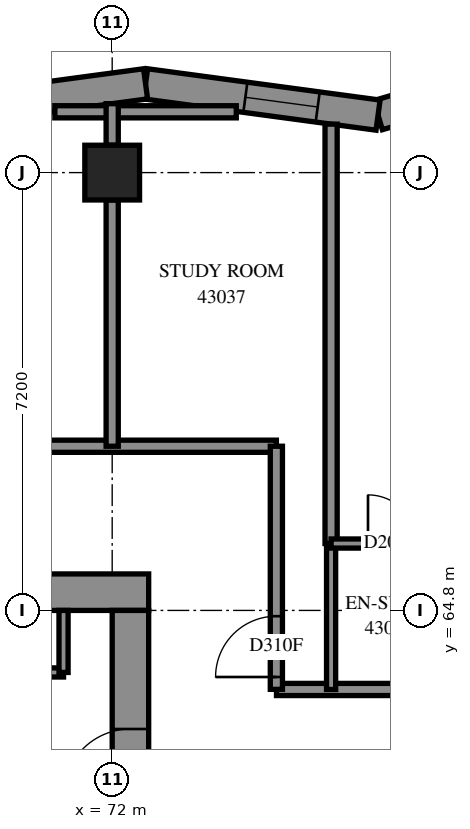
"""IFC4 building model, lengths in metres.
Left out: names, types, materials, properties, quantities, classifications, styles, units other than length and angle.
Written with IfcOpenShell. Run it as: python <this file> out.ifc"""

import sys

from ifc_helpers import new_model, si_unit, direction, frame, frame_2d, origin, origin_2d, place, context, subcontext, project, spatial, polyline, rectangle, outline, extrude, element, fill, save


model = new_model("IFC4")
c1 = context("Model", 3, precision=1e-05, world=origin(), true_north=direction((0.0, 1.0)))
c2 = subcontext(c1, "Body", "Model", "MODEL_VIEW")
j1 = project(units=[si_unit("LENGTHUNIT", "METRE"), si_unit("PLANEANGLEUNIT", "RADIAN")], contexts=[c1])
p1 = place(None, origin())
s1 = spatial("IfcSite", under=j1, at=p1, CompositionType="ELEMENT")
p2 = place(p1, origin())
s2 = spatial("IfcBuilding", under=s1, at=p2, CompositionType="ELEMENT")
p3 = place(p2, frame((0.0, 0.0, 159.2)))
s3 = spatial("IfcBuildingStorey", under=s2, at=p3, CompositionType="ELEMENT", Elevation=159.2)
p4 = place(p3, frame((72.0, 72.0, 0.0), z_axis=(0.0, 0.0, 1.0), x_axis=(1.0, 0.0, 0.0)))
e1 = element("IfcColumn", 1, at=p4, inside=s3, PredefinedType="COLUMN", context=c2, shape_type="SweptSolid", body=[
    extrude(rectangle(XDim=0.9, YDim=0.9, at=origin_2d()), origin(), (0.0, 0.0, 1.0), 3.1),
])
p5 = place(p3, frame((57.0, 65.1, -0.3), z_axis=(0.0, 0.0, 1.0), x_axis=(1.0, 0.0, 0.0)))
e2 = element("IfcWall", 2, at=p5, inside=s3, PredefinedType="SHEAR", context=c2, shape_type="SweptSolid", body=[
    extrude(rectangle(XDim=15.6, YDim=0.6, at=frame_2d((7.8, 0.0))), origin(), (0.0, 0.0, 1.0), 2.7),
])
p6 = place(p5, frame((10.6, 0.0, 0.3)))
e3 = element("IfcOpeningElement", 3, at=p6, cuts=e2, PredefinedType="OPENING", context=c2, shape_type="SweptSolid", body=[
    extrude(rectangle(XDim=0.8, YDim=2.1, at=frame_2d((0.4, 1.05))), frame((0.0, 0.31, 0.0), z_axis=(0.0, -1.0, 0.0), x_axis=(1.0, 0.0, 0.0)), (0.0, 0.0, 1.0), 0.62),
])
p7 = place(p3, frame((72.3, 50.4, -0.3), z_axis=(0.0, 0.0, 1.0), x_axis=(0.0, 1.0, 0.0)))
e4 = element("IfcWall", 4, at=p7, inside=s3, PredefinedType="SHEAR", context=c2, shape_type="SweptSolid", body=[
    extrude(rectangle(XDim=14.4, YDim=0.6, at=frame_2d((7.2, 0.0))), origin(), (0.0, 0.0, 1.0), 2.7),
])
p8 = place(p7, frame((4.55, 0.0, 0.3)))
e5 = element("IfcOpeningElement", 5, at=p8, cuts=e4, PredefinedType="OPENING", context=c2, shape_type="SweptSolid", body=[
    extrude(rectangle(XDim=1.1, YDim=2.1, at=frame_2d((0.55, 1.05))), frame((0.0, 0.31, 0.0), z_axis=(0.0, -1.0, 0.0), x_axis=(1.0, 0.0, 0.0)), (0.0, 0.0, 1.0), 0.62),
])
p9 = place(p7, frame((11.35, 0.0, 0.3)))
e6 = element("IfcOpeningElement", 6, at=p9, cuts=e4, PredefinedType="OPENING", context=c2, shape_type="SweptSolid", body=[
    extrude(rectangle(XDim=1.1, YDim=2.1, at=frame_2d((0.55, 1.05))), frame((0.0, 0.31, 0.0), z_axis=(0.0, -1.0, 0.0), x_axis=(1.0, 0.0, 0.0)), (0.0, 0.0, 1.0), 0.62),
])
p10 = place(p3, frame((80.028, 74.014, 0.0), z_axis=(0.0, 0.0, 1.0), x_axis=(-0.9598407547, -0.2805454075, 0.0)))
e7 = element("IfcWall", 7, at=p10, inside=s3, PredefinedType="SOLIDWALL", context=c2, shape_type="SweptSolid", body=[
    extrude(outline(polyline([(-0.208, -0.25), (3.756, -0.25), (3.862, 0.25), (0.208, 0.25), (-0.208, -0.25)])), origin(), (0.0, 0.0, 1.0), 3.1),
])
p11 = place(p10, frame((1.286, 0.0, 0.45)))
e8 = element("IfcOpeningElement", 8, at=p11, cuts=e7, PredefinedType="OPENING", context=c2, shape_type="SweptSolid", body=[
    extrude(rectangle(XDim=1.2, YDim=2.5, at=frame_2d((0.6, 1.25))), frame((0.0, 0.26, 0.0), z_axis=(0.0, -1.0, 0.0), x_axis=(1.0, 0.0, 0.0)), (0.0, 0.0, 1.0), 0.52),
])
p12 = place(p3, frame((76.373, 72.945, 0.0), z_axis=(0.0, 0.0, 1.0), x_axis=(-0.9910680415, 0.1333571784, 0.0)))
e9 = element("IfcWall", 9, at=p12, inside=s3, PredefinedType="SOLIDWALL", context=c2, shape_type="SweptSolid", body=[
    extrude(outline(polyline([(0.053, -0.25), (3.892, -0.25), (3.824, 0.25), (-0.053, 0.25), (0.053, -0.25)])), origin(), (0.0, 0.0, 1.0), 3.1),
])
p13 = place(p12, frame((1.002, 0.0, 0.45)))
e10 = element("IfcOpeningElement", 10, at=p13, cuts=e9, PredefinedType="OPENING", context=c2, shape_type="SweptSolid", body=[
    extrude(rectangle(XDim=1.2, YDim=2.5, at=frame_2d((0.6, 1.25))), frame((0.0, 0.26, 0.0), z_axis=(0.0, -1.0, 0.0), x_axis=(1.0, 0.0, 0.0)), (0.0, 0.0, 1.0), 0.52),
])
p14 = place(p3, frame((72.549, 73.46, 0.0), z_axis=(0.0, 0.0, 1.0), x_axis=(-0.9910651652, -0.1333785524, 0.0)))
e11 = element("IfcWall", 11, at=p14, inside=s3, PredefinedType="SOLIDWALL", context=c2, shape_type="SweptSolid", body=[
    extrude(outline(polyline([(-0.034, -0.25), (3.805, -0.25), (3.872, 0.25), (0.034, 0.25), (-0.034, -0.25)])), origin(), (0.0, 0.0, 1.0), 3.1),
])
p15 = place(p14, frame((1.668, 0.0, 0.7)))
e12 = element("IfcOpeningElement", 12, at=p15, cuts=e11, PredefinedType="OPENING", context=c2, shape_type="SweptSolid", body=[
    extrude(rectangle(XDim=1.8, YDim=2.2, at=frame_2d((0.9, 1.1))), frame((0.0, 0.26, 0.0), z_axis=(0.0, -1.0, 0.0), x_axis=(1.0, 0.0, 0.0)), (0.0, 0.0, 1.0), 0.52),
])
p16 = place(p3, frame((64.95, 63.78, 0.0), z_axis=(0.0, 0.0, 1.0), x_axis=(1.0, 0.0, 0.0)))
e13 = element("IfcWall", 13, at=p16, inside=s3, PredefinedType="PARTITIONING", context=c2, shape_type="SweptSolid", body=[
    extrude(rectangle(XDim=6.25, YDim=0.15, at=frame_2d((3.125, 0.0))), origin(), (0.0, 0.0, 1.0), 3.1),
])
p17 = place(p3, frame((71.2, 63.78, 0.0), z_axis=(0.0, 0.0, 1.0), x_axis=(0.0, 1.0, 0.0)))
e14 = element("IfcWall", 14, at=p17, inside=s3, PredefinedType="PARTITIONING", context=c2, shape_type="SweptSolid", body=[
    extrude(rectangle(XDim=1.02, YDim=0.15, at=frame_2d((0.51, 0.0))), origin(), (0.0, 0.0, 1.0), 3.1),
])
p18 = place(p3, frame((54.9, 67.5, 0.0), z_axis=(0.0, 0.0, 1.0), x_axis=(1.0, 0.0, 0.0)))
e15 = element("IfcWall", 15, at=p18, inside=s3, PredefinedType="PARTITIONING", context=c2, shape_type="SweptSolid", body=[
    extrude(rectangle(XDim=19.8, YDim=0.2, at=frame_2d((9.9, 0.0))), origin(), (0.0, 0.0, 1.0), 3.1),
])
p19 = place(p18, frame((6.599, 0.0, 0.0)))
e16 = element("IfcOpeningElement", 16, at=p19, cuts=e15, PredefinedType="OPENING", context=c2, shape_type="SweptSolid", body=[
    extrude(rectangle(XDim=0.9, YDim=2.1, at=frame_2d((0.45, 1.05))), frame((0.0, 0.11, 0.0), z_axis=(0.0, -1.0, 0.0), x_axis=(1.0, 0.0, 0.0)), (0.0, 0.0, 1.0), 0.22),
])
p20 = place(p18, frame((13.799, 0.0, 0.0)))
e17 = element("IfcOpeningElement", 17, at=p20, cuts=e15, PredefinedType="OPENING", context=c2, shape_type="SweptSolid", body=[
    extrude(rectangle(XDim=0.9, YDim=2.1, at=frame_2d((0.45, 1.05))), frame((0.0, 0.11, 0.0), z_axis=(0.0, -1.0, 0.0), x_axis=(1.0, 0.0, 0.0)), (0.0, 0.0, 1.0), 0.22),
])
p21 = place(p3, frame((75.6, 65.9, 0.0), z_axis=(0.0, 0.0, 1.0), x_axis=(0.0, 1.0, 0.0)))
e18 = element("IfcWall", 18, at=p21, inside=s3, PredefinedType="PARTITIONING", context=c2, shape_type="SweptSolid", body=[
    extrude(rectangle(XDim=6.897, YDim=0.2, at=frame_2d((3.448, 0.0))), origin(), (0.0, 0.0, 1.0), 3.1),
])
p22 = place(p3, frame((74.702, 63.5, 0.0), z_axis=(0.0, 0.0, 1.0), x_axis=(1.0, 0.0, 0.0)))
e19 = element("IfcWall", 19, at=p22, inside=s3, PredefinedType="PARTITIONING", context=c2, shape_type="SweptSolid", body=[
    extrude(rectangle(XDim=4.498, YDim=0.2, at=frame_2d((2.249, 0.0))), origin(), (0.0, 0.0, 1.0), 3.1),
])
p23 = place(p22, frame((3.046, 0.0, 0.0)))
e20 = element("IfcOpeningElement", 20, at=p23, cuts=e19, PredefinedType="OPENING", context=c2, shape_type="SweptSolid", body=[
    extrude(rectangle(XDim=0.9, YDim=2.1, at=frame_2d((0.45, 1.05))), frame((0.0, 0.11, 0.0), z_axis=(0.0, -1.0, 0.0), x_axis=(1.0, 0.0, 0.0)), (0.0, 0.0, 1.0), 0.22),
])
p24 = place(p3, frame((72.0, 67.5, 0.0), z_axis=(0.0, 0.0, 1.0), x_axis=(0.0, 1.0, 0.0)))
e21 = element("IfcWall", 21, at=p24, inside=s3, PredefinedType="PARTITIONING", context=c2, shape_type="SweptSolid", body=[
    extrude(rectangle(XDim=4.05, YDim=0.2, at=frame_2d((2.025, 0.0))), origin(), (0.0, 0.0, 1.0), 3.1),
])
p25 = place(p3, frame((74.7, 63.502, 0.0), z_axis=(0.0, 0.0, 1.0), x_axis=(0.0, 1.0, 0.0)))
e22 = element("IfcWall", 22, at=p25, inside=s3, PredefinedType="PARTITIONING", context=c2, shape_type="SweptSolid", body=[
    extrude(rectangle(XDim=3.998, YDim=0.2, at=frame_2d((1.999, 0.0))), origin(), (0.0, 0.0, 1.0), 3.1),
])
p26 = place(p25, frame((0.203, 0.0, 0.0)))
e23 = element("IfcOpeningElement", 23, at=p26, cuts=e22, PredefinedType="OPENING", context=c2, shape_type="SweptSolid", body=[
    extrude(rectangle(XDim=1.0, YDim=2.1, at=frame_2d((0.5, 1.05))), frame((0.0, 0.11, 0.0), z_axis=(0.0, -1.0, 0.0), x_axis=(1.0, 0.0, 0.0)), (0.0, 0.0, 1.0), 0.22),
])
p27 = place(p3, frame((71.057, 73.0, 0.0), z_axis=(0.0, 0.0, 1.0), x_axis=(1.0, 0.0, 0.0)))
e24 = element("IfcWall", 24, at=p27, inside=s3, PredefinedType="PARTITIONING", context=c2, shape_type="SweptSolid", body=[
    extrude(rectangle(XDim=2.983, YDim=0.2, at=frame_2d((1.492, 0.0))), origin(), (0.0, 0.0, 1.0), 3.1),
])
p28 = place(p3, frame((75.6, 63.5, 0.0), z_axis=(0.0, 0.0, 1.0), x_axis=(0.0, 1.0, 0.0)))
e25 = element("IfcWall", 25, at=p28, inside=s3, PredefinedType="PARTITIONING", context=c2, shape_type="SweptSolid", body=[
    extrude(rectangle(XDim=2.4, YDim=0.15, at=frame_2d((1.2, 0.0))), origin(), (0.0, 0.0, 1.0), 3.1),
])
p29 = place(p3, frame((75.6, 65.9, 0.0), z_axis=(0.0, 0.0, 1.0), x_axis=(1.0, 0.0, 0.0)))
e26 = element("IfcWall", 26, at=p29, inside=s3, PredefinedType="PARTITIONING", context=c2, shape_type="SweptSolid", body=[
    extrude(rectangle(XDim=1.9, YDim=0.15, at=frame_2d((0.95, 0.0))), origin(), (0.0, 0.0, 1.0), 3.1),
])
p30 = place(p29, frame((0.607, 0.0, 0.0)))
e27 = element("IfcOpeningElement", 27, at=p30, cuts=e26, PredefinedType="OPENING", context=c2, shape_type="SweptSolid", body=[
    extrude(rectangle(XDim=0.8, YDim=2.1, at=frame_2d((0.4, 1.05))), frame((0.0, 0.085, 0.0), z_axis=(0.0, -1.0, 0.0), x_axis=(1.0, 0.0, 0.0)), (0.0, 0.0, 1.0), 0.17),
])
p31 = place(p3, frame((72.0, 72.45, 0.0), z_axis=(0.0, 0.0, 1.0), x_axis=(0.0, 1.0, 0.0)))
e28 = element("IfcWall", 28, at=p31, inside=s3, PredefinedType="PARTITIONING", context=c2, shape_type="SweptSolid", body=[
    extrude(rectangle(XDim=0.684, YDim=0.2, at=frame_2d((0.342, 0.0))), origin(), (0.0, 0.0, 1.0), 3.1),
])
p32 = place(p13, origin())
e29 = element("IfcWindow", 29, at=p32, inside=s3, PartitioningType="SINGLE_PANEL", PredefinedType="WINDOW", context=c2, shape_type="SweptSolid", body=[
    extrude(rectangle(XDim=1.2, YDim=2.5, at=frame_2d((0.6, 1.25))), frame((0.0, 0.18, 0.0), z_axis=(0.0, -1.0, 0.0), x_axis=(1.0, 0.0, 0.0)), (0.0, 0.0, 1.0), 0.06),
])
fill(e10, e29)
p33 = place(p9, origin())
e30 = element("IfcDoor", 30, at=p33, inside=s3, OperationType="SINGLE_SWING_RIGHT", PredefinedType="DOOR", context=c2, shape_type="SweptSolid", body=[
    extrude(rectangle(XDim=1.1, YDim=2.1, at=frame_2d((0.55, 1.05))), frame((0.0, 0.025, 0.0), z_axis=(0.0, -1.0, 0.0), x_axis=(1.0, 0.0, 0.0)), (0.0, 0.0, 1.0), 0.05),
])
fill(e6, e30)
p34 = place(p26, origin())
e31 = element("IfcDoor", 31, at=p34, inside=s3, OperationType="SINGLE_SWING_RIGHT", PredefinedType="DOOR", context=c2, shape_type="SweptSolid", body=[
    extrude(rectangle(XDim=1.0, YDim=2.1, at=frame_2d((0.5, 1.05))), frame((0.0, 0.025, 0.0), z_axis=(0.0, -1.0, 0.0), x_axis=(1.0, 0.0, 0.0)), (0.0, 0.0, 1.0), 0.05),
])
fill(e23, e31)
p35 = place(p30, origin())
e32 = element("IfcDoor", 32, at=p35, inside=s3, OperationType="SINGLE_SWING_RIGHT", PredefinedType="DOOR", context=c2, shape_type="SweptSolid", body=[
    extrude(rectangle(XDim=0.8, YDim=2.1, at=frame_2d((0.4, 1.05))), frame((0.0, 0.025, 0.0), z_axis=(0.0, -1.0, 0.0), x_axis=(1.0, 0.0, 0.0)), (0.0, 0.0, 1.0), 0.05),
])
fill(e27, e32)
save(model, sys.argv[1])
